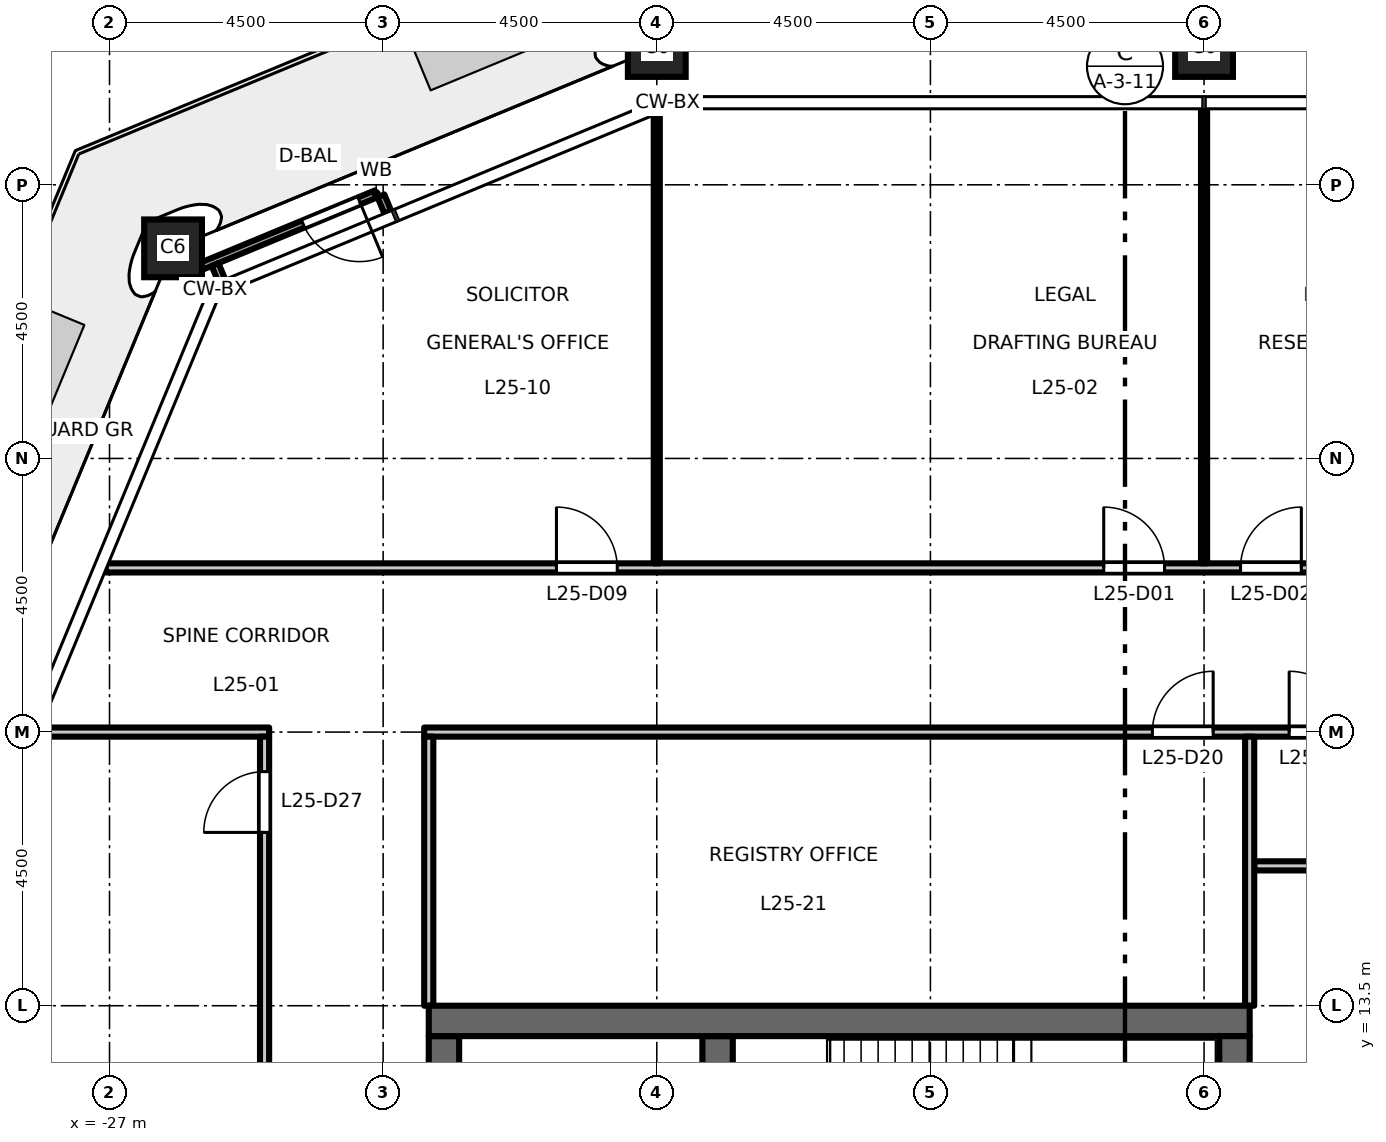
"""IFC4 building model, lengths in metres.
Left out: names, types, materials, properties, quantities, classifications, styles, units other than length and angle.
Written with IfcOpenShell. Run it as: python <this file> out.ifc"""

import sys

from ifc_helpers import new_model, si_unit, direction, frame, frame_2d, origin, origin_2d, place, context, subcontext, project, spatial, rectangle, hollow_rectangle, extrude, element, fill, save


model = new_model("IFC4")
c1 = context("Model", 3, precision=1e-05, world=origin(), true_north=direction((0.0, 1.0)))
c2 = subcontext(c1, "Body", "Model", "MODEL_VIEW")
j1 = project(units=[si_unit("LENGTHUNIT", "METRE"), si_unit("PLANEANGLEUNIT", "RADIAN")], contexts=[c1])
p1 = place(None, origin())
s1 = spatial("IfcSite", under=j1, at=p1, CompositionType="ELEMENT")
p2 = place(p1, origin())
s2 = spatial("IfcBuilding", under=s1, at=p2, CompositionType="ELEMENT")
p3 = place(p2, frame((0.0, 0.0, 118.2)))
s3 = spatial("IfcBuildingStorey", under=s2, at=p3, CompositionType="ELEMENT", Elevation=118.2)
for number, where, z_axis, x_axis in (
    (1, (-9.0, 29.25, 0.0), (0.0, 0.0, 1.0), (1.0, 0.0, 0.0)),
    (2, (-18.0, 29.25, 0.0), (0.0, 0.0, 1.0), (1.0, 0.0, 0.0)),
    (3, (-25.955, 25.955, 0.0), (0.0, 0.0, 1.0), (1.0, 0.0, 0.0)),
):
    element("IfcColumn", number, at=place(p3, frame(where, z_axis=z_axis, x_axis=x_axis)), inside=s3, PredefinedType="COLUMN", context=c2, shape_type="SweptSolid", body=[
        extrude(hollow_rectangle(XDim=0.95, YDim=0.95, WallThickness=0.055, at=origin_2d()), origin(), (0.0, 0.0, 1.0), 4.5),
    ])
p4 = place(p3, frame((-21.5, -13.0, 0.0), z_axis=(0.0, 0.0, 1.0), x_axis=(0.0, 1.0, 0.0)))
e4 = element("IfcWall", 4, at=p4, inside=s3, PredefinedType="SHEAR", context=c2, shape_type="SweptSolid", body=[
    extrude(rectangle(XDim=26.0, YDim=0.5, at=frame_2d((13.0, 0.0))), origin(), (0.0, 0.0, 1.0), 4.35),
])
p5 = place(p4, frame((16.825, 0.0, 0.0)))
e5 = element("IfcOpeningElement", 5, at=p5, cuts=e4, PredefinedType="OPENING", context=c2, shape_type="SweptSolid", body=[
    extrude(rectangle(XDim=1.8, YDim=2.1, at=frame_2d((0.9, 1.05))), frame((0.0, 0.26, 0.0), z_axis=(0.0, -1.0, 0.0), x_axis=(1.0, 0.0, 0.0)), (0.0, 0.0, 1.0), 0.52),
])
p6 = place(p4, frame((7.375, 0.0, 0.0)))
e6 = element("IfcOpeningElement", 6, at=p6, cuts=e4, PredefinedType="OPENING", context=c2, shape_type="SweptSolid", body=[
    extrude(rectangle(XDim=1.8, YDim=2.1, at=frame_2d((0.9, 1.05))), frame((0.0, 0.26, 0.0), z_axis=(0.0, -1.0, 0.0), x_axis=(1.0, 0.0, 0.0)), (0.0, 0.0, 1.0), 0.52),
])
p7 = place(p4, frame((22.45, 0.0, 0.0)))
e7 = element("IfcOpeningElement", 7, at=p7, cuts=e4, PredefinedType="OPENING", context=c2, shape_type="SweptSolid", body=[
    extrude(rectangle(XDim=0.9, YDim=2.1, at=frame_2d((0.45, 1.05))), frame((0.0, 0.26, 0.0), z_axis=(0.0, -1.0, 0.0), x_axis=(1.0, 0.0, 0.0)), (0.0, 0.0, 1.0), 0.52),
])
p8 = place(p4, frame((1.7, 0.0, 0.0)))
e8 = element("IfcOpeningElement", 8, at=p8, cuts=e4, PredefinedType="OPENING", context=c2, shape_type="SweptSolid", body=[
    extrude(rectangle(XDim=0.9, YDim=2.1, at=frame_2d((0.45, 1.05))), frame((0.0, 0.26, 0.0), z_axis=(0.0, -1.0, 0.0), x_axis=(1.0, 0.0, 0.0)), (0.0, 0.0, 1.0), 0.52),
])
p9 = place(p3, frame((-17.0, 6.425, 0.0), z_axis=(0.0, 0.0, 1.0), x_axis=(0.0, 1.0, 0.0)))
e9 = element("IfcWall", 9, at=p9, inside=s3, PredefinedType="SHEAR", context=c2, shape_type="SweptSolid", body=[
    extrude(rectangle(XDim=6.575, YDim=0.5, at=frame_2d((3.288, 0.0))), origin(), (0.0, 0.0, 1.0), 4.35),
])
p10 = place(p3, frame((-8.25, 13.25, 0.0), z_axis=(0.0, 0.0, 1.0), x_axis=(-1.0, 0.0, 0.0)))
e10 = element("IfcWall", 10, at=p10, inside=s3, PredefinedType="SHEAR", context=c2, shape_type="SweptSolid", body=[
    extrude(rectangle(XDim=13.5, YDim=0.5, at=frame_2d((6.75, 0.0))), origin(), (0.0, 0.0, 1.0), 4.35),
])
p11 = place(p3, frame((-8.5, -13.0, 0.0), z_axis=(0.0, 0.0, 1.0), x_axis=(0.0, 1.0, 0.0)))
e11 = element("IfcWall", 11, at=p11, inside=s3, PredefinedType="SHEAR", context=c2, shape_type="SweptSolid", body=[
    extrude(rectangle(XDim=26.0, YDim=0.5, at=frame_2d((13.0, 0.0))), origin(), (0.0, 0.0, 1.0), 4.35),
])
for number, where, z_axis, x_axis in (
    (12, (-22.425, 26.551, 0.0), (0.0, 0.0, 1.0), (-0.382, 0.924, 0.0)),
    (13, (-25.153, 25.421, 0.0), (0.0, 0.0, 1.0), (-0.383, 0.924, 0.0)),
):
    element("IfcWall", number, at=place(p3, frame(where, z_axis=z_axis, x_axis=x_axis)), inside=s3, PredefinedType="STANDARD", context=c2, shape_type="SweptSolid", body=[
        extrude(rectangle(XDim=0.29, YDim=0.12, at=frame_2d((0.145, 0.0))), origin(), (0.0, 0.0, 1.0), 4.35),
    ])
p12 = place(p3, frame((-22.615, 26.852, 0.0), z_axis=(0.0, 0.0, 1.0), x_axis=(-0.923869084389, -0.382708655389, 0.0)))
e14 = element("IfcWall", 14, at=p12, inside=s3, PredefinedType="STANDARD", context=c2, shape_type="SweptSolid", body=[
    extrude(rectangle(XDim=3.102, YDim=0.12, at=frame_2d((1.551, 0.0))), origin(), (0.0, 0.0, 1.0), 4.35),
])
p13 = place(p12, frame((0.3, 0.0, 0.0)))
e15 = element("IfcOpeningElement", 15, at=p13, cuts=e14, PredefinedType="OPENING", context=c2, shape_type="SweptSolid", body=[
    extrude(rectangle(XDim=1.0, YDim=2.4, at=frame_2d((0.5, 1.2))), frame((0.0, 0.07, 0.0), z_axis=(0.0, -1.0, 0.0), x_axis=(1.0, 0.0, 0.0)), (0.0, 0.0, 1.0), 0.14),
])
p14 = place(p3, frame((-8.175, 15.8, 0.0), z_axis=(0.0, 0.0, 1.0), x_axis=(1.0, 0.0, 0.0)))
e16 = element("IfcWall", 16, at=p14, inside=s3, PredefinedType="PARTITIONING", context=c2, shape_type="SweptSolid", body=[
    extrude(rectangle(XDim=14.715, YDim=0.15, at=frame_2d((7.357, 0.0))), origin(), (0.0, 0.0, 1.0), 4.35),
])
p15 = place(p14, frame((4.325, 0.0, 0.0)))
e17 = element("IfcOpeningElement", 17, at=p15, cuts=e16, PredefinedType="OPENING", context=c2, shape_type="SweptSolid", body=[
    extrude(rectangle(XDim=1.0, YDim=2.1, at=frame_2d((0.5, 1.05))), frame((0.0, 0.085, 0.0), z_axis=(0.0, -1.0, 0.0), x_axis=(1.0, 0.0, 0.0)), (0.0, 0.0, 1.0), 0.17),
])
p16 = place(p14, frame((6.575, 0.0, 0.0)))
e18 = element("IfcOpeningElement", 18, at=p16, cuts=e16, PredefinedType="OPENING", context=c2, shape_type="SweptSolid", body=[
    extrude(rectangle(XDim=1.0, YDim=2.1, at=frame_2d((0.5, 1.05))), frame((0.0, 0.085, 0.0), z_axis=(0.0, -1.0, 0.0), x_axis=(1.0, 0.0, 0.0)), (0.0, 0.0, 1.0), 0.17),
])
p17 = place(p14, frame((13.075, 0.0, 0.0)))
e19 = element("IfcOpeningElement", 19, at=p17, cuts=e16, PredefinedType="OPENING", context=c2, shape_type="SweptSolid", body=[
    extrude(rectangle(XDim=1.0, YDim=2.1, at=frame_2d((0.5, 1.05))), frame((0.0, 0.085, 0.0), z_axis=(0.0, -1.0, 0.0), x_axis=(1.0, 0.0, 0.0)), (0.0, 0.0, 1.0), 0.17),
])
p18 = place(p3, frame((-28.178, 18.0, 0.0), z_axis=(0.0, 0.0, 1.0), x_axis=(1.0, 0.0, 0.0)))
e20 = element("IfcWall", 20, at=p18, inside=s3, PredefinedType="PARTITIONING", context=c2, shape_type="SweptSolid", body=[
    extrude(rectangle(XDim=3.803, YDim=0.15, at=frame_2d((1.901, 0.0))), origin(), (0.0, 0.0, 1.0), 4.35),
])
p19 = place(p3, frame((-21.825, 18.0, 0.0), z_axis=(0.0, 0.0, 1.0), x_axis=(1.0, 0.0, 0.0)))
e21 = element("IfcWall", 21, at=p19, inside=s3, PredefinedType="PARTITIONING", context=c2, shape_type="SweptSolid", body=[
    extrude(rectangle(XDim=43.65, YDim=0.15, at=frame_2d((21.825, 0.0))), origin(), (0.0, 0.0, 1.0), 4.35),
])
p20 = place(p19, frame((14.225, 0.0, 0.0)))
e22 = element("IfcOpeningElement", 22, at=p20, cuts=e21, PredefinedType="OPENING", context=c2, shape_type="SweptSolid", body=[
    extrude(rectangle(XDim=1.0, YDim=2.1, at=frame_2d((0.5, 1.05))), frame((0.0, 0.085, 0.0), z_axis=(0.0, -1.0, 0.0), x_axis=(1.0, 0.0, 0.0)), (0.0, 0.0, 1.0), 0.17),
])
p21 = place(p19, frame((11.975, 0.0, 0.0)))
e23 = element("IfcOpeningElement", 23, at=p21, cuts=e21, PredefinedType="OPENING", context=c2, shape_type="SweptSolid", body=[
    extrude(rectangle(XDim=1.0, YDim=2.1, at=frame_2d((0.5, 1.05))), frame((0.0, 0.085, 0.0), z_axis=(0.0, -1.0, 0.0), x_axis=(1.0, 0.0, 0.0)), (0.0, 0.0, 1.0), 0.17),
])
p22 = place(p19, frame((30.725, 0.0, 0.0)))
e24 = element("IfcOpeningElement", 24, at=p22, cuts=e21, PredefinedType="OPENING", context=c2, shape_type="SweptSolid", body=[
    extrude(rectangle(XDim=1.0, YDim=2.1, at=frame_2d((0.5, 1.05))), frame((0.0, 0.085, 0.0), z_axis=(0.0, -1.0, 0.0), x_axis=(1.0, 0.0, 0.0)), (0.0, 0.0, 1.0), 0.17),
])
p23 = place(p3, frame((-27.06, 20.7, 0.0), z_axis=(0.0, 0.0, 1.0), x_axis=(1.0, 0.0, 0.0)))
e25 = element("IfcWall", 25, at=p23, inside=s3, PredefinedType="PARTITIONING", context=c2, shape_type="SweptSolid", body=[
    extrude(rectangle(XDim=54.12, YDim=0.15, at=frame_2d((27.06, 0.0))), origin(), (0.0, 0.0, 1.0), 4.35),
])
p24 = place(p23, frame((16.41, 0.0, 0.0)))
e26 = element("IfcOpeningElement", 26, at=p24, cuts=e25, PredefinedType="OPENING", context=c2, shape_type="SweptSolid", body=[
    extrude(rectangle(XDim=1.0, YDim=2.1, at=frame_2d((0.5, 1.05))), frame((0.0, 0.085, 0.0), z_axis=(0.0, -1.0, 0.0), x_axis=(1.0, 0.0, 0.0)), (0.0, 0.0, 1.0), 0.17),
])
p25 = place(p23, frame((18.66, 0.0, 0.0)))
e27 = element("IfcOpeningElement", 27, at=p25, cuts=e25, PredefinedType="OPENING", context=c2, shape_type="SweptSolid", body=[
    extrude(rectangle(XDim=1.0, YDim=2.1, at=frame_2d((0.5, 1.05))), frame((0.0, 0.085, 0.0), z_axis=(0.0, -1.0, 0.0), x_axis=(1.0, 0.0, 0.0)), (0.0, 0.0, 1.0), 0.17),
])
p26 = place(p23, frame((34.41, 0.0, 0.0)))
e28 = element("IfcOpeningElement", 28, at=p26, cuts=e25, PredefinedType="OPENING", context=c2, shape_type="SweptSolid", body=[
    extrude(rectangle(XDim=1.0, YDim=2.1, at=frame_2d((0.5, 1.05))), frame((0.0, 0.085, 0.0), z_axis=(0.0, -1.0, 0.0), x_axis=(1.0, 0.0, 0.0)), (0.0, 0.0, 1.0), 0.17),
])
p27 = place(p23, frame((36.66, 0.0, 0.0)))
e29 = element("IfcOpeningElement", 29, at=p27, cuts=e25, PredefinedType="OPENING", context=c2, shape_type="SweptSolid", body=[
    extrude(rectangle(XDim=1.0, YDim=2.1, at=frame_2d((0.5, 1.05))), frame((0.0, 0.085, 0.0), z_axis=(0.0, -1.0, 0.0), x_axis=(1.0, 0.0, 0.0)), (0.0, 0.0, 1.0), 0.17),
])
p28 = place(p23, frame((7.41, 0.0, 0.0)))
e30 = element("IfcOpeningElement", 30, at=p28, cuts=e25, PredefinedType="OPENING", context=c2, shape_type="SweptSolid", body=[
    extrude(rectangle(XDim=1.0, YDim=2.1, at=frame_2d((0.5, 1.05))), frame((0.0, 0.085, 0.0), z_axis=(0.0, -1.0, 0.0), x_axis=(1.0, 0.0, 0.0)), (0.0, 0.0, 1.0), 0.17),
])
p29 = place(p23, frame((45.72, 0.0, 0.0)))
e31 = element("IfcOpeningElement", 31, at=p29, cuts=e25, PredefinedType="OPENING", context=c2, shape_type="SweptSolid", body=[
    extrude(rectangle(XDim=1.0, YDim=2.1, at=frame_2d((0.5, 1.05))), frame((0.0, 0.085, 0.0), z_axis=(0.0, -1.0, 0.0), x_axis=(1.0, 0.0, 0.0)), (0.0, 0.0, 1.0), 0.17),
])
p30 = place(p3, frame((-24.45, -17.925, 0.0), z_axis=(0.0, 0.0, 1.0), x_axis=(0.0, 1.0, 0.0)))
e32 = element("IfcWall", 32, at=p30, inside=s3, PredefinedType="PARTITIONING", context=c2, shape_type="SweptSolid", body=[
    extrude(rectangle(XDim=35.85, YDim=0.15, at=frame_2d((17.925, 0.0))), origin(), (0.0, 0.0, 1.0), 4.35),
])
p31 = place(p30, frame((0.525, 0.0, 0.0)))
e33 = element("IfcOpeningElement", 33, at=p31, cuts=e32, PredefinedType="OPENING", context=c2, shape_type="SweptSolid", body=[
    extrude(rectangle(XDim=1.0, YDim=2.1, at=frame_2d((0.5, 1.05))), frame((0.0, 0.085, 0.0), z_axis=(0.0, -1.0, 0.0), x_axis=(1.0, 0.0, 0.0)), (0.0, 0.0, 1.0), 0.17),
])
p32 = place(p30, frame((16.275, 0.0, 0.0)))
e34 = element("IfcOpeningElement", 34, at=p32, cuts=e32, PredefinedType="OPENING", context=c2, shape_type="SweptSolid", body=[
    extrude(rectangle(XDim=1.0, YDim=2.1, at=frame_2d((0.5, 1.05))), frame((0.0, 0.085, 0.0), z_axis=(0.0, -1.0, 0.0), x_axis=(1.0, 0.0, 0.0)), (0.0, 0.0, 1.0), 0.17),
])
p33 = place(p30, frame((18.525, 0.0, 0.0)))
e35 = element("IfcOpeningElement", 35, at=p33, cuts=e32, PredefinedType="OPENING", context=c2, shape_type="SweptSolid", body=[
    extrude(rectangle(XDim=1.0, YDim=2.1, at=frame_2d((0.5, 1.05))), frame((0.0, 0.085, 0.0), z_axis=(0.0, -1.0, 0.0), x_axis=(1.0, 0.0, 0.0)), (0.0, 0.0, 1.0), 0.17),
])
p34 = place(p30, frame((34.275, 0.0, 0.0)))
e36 = element("IfcOpeningElement", 36, at=p34, cuts=e32, PredefinedType="OPENING", context=c2, shape_type="SweptSolid", body=[
    extrude(rectangle(XDim=1.0, YDim=2.1, at=frame_2d((0.5, 1.05))), frame((0.0, 0.085, 0.0), z_axis=(0.0, -1.0, 0.0), x_axis=(1.0, 0.0, 0.0)), (0.0, 0.0, 1.0), 0.17),
])
p35 = place(p3, frame((-21.75, 13.5, 0.0), z_axis=(0.0, 0.0, 1.0), x_axis=(0.0, 1.0, 0.0)))
e37 = element("IfcWall", 37, at=p35, inside=s3, PredefinedType="PARTITIONING", context=c2, shape_type="SweptSolid", body=[
    extrude(rectangle(XDim=4.425, YDim=0.15, at=frame_2d((2.212, 0.0))), origin(), (0.0, 0.0, 1.0), 4.35),
])
p36 = place(p3, frame((-18.0, 20.775, 0.0), z_axis=(0.0, 0.0, 1.0), x_axis=(0.0, 1.0, 0.0)))
e38 = element("IfcWall", 38, at=p36, inside=s3, PredefinedType="PARTITIONING", context=c2, shape_type="SweptSolid", body=[
    extrude(rectangle(XDim=7.403, YDim=0.1, at=frame_2d((3.702, 0.0))), origin(), (0.0, 0.0, 1.0), 3.45),
])
p37 = place(p3, frame((-9.0, 20.775, 0.0), z_axis=(0.0, 0.0, 1.0), x_axis=(0.0, 1.0, 0.0)))
e39 = element("IfcWall", 39, at=p37, inside=s3, PredefinedType="PARTITIONING", context=c2, shape_type="SweptSolid", body=[
    extrude(rectangle(XDim=7.485, YDim=0.1, at=frame_2d((3.743, 0.0))), origin(), (0.0, 0.0, 1.0), 3.45),
])
p38 = place(p3, frame((-8.25, 13.5, 0.0), z_axis=(0.0, 0.0, 1.0), x_axis=(0.0, 1.0, 0.0)))
e40 = element("IfcWall", 40, at=p38, inside=s3, PredefinedType="PARTITIONING", context=c2, shape_type="SweptSolid", body=[
    extrude(rectangle(XDim=4.425, YDim=0.15, at=frame_2d((2.212, 0.0))), origin(), (0.0, 0.0, 1.0), 4.35),
])
p39 = place(p13, origin())
e41 = element("IfcDoor", 41, at=p39, inside=s3, OperationType="SINGLE_SWING_LEFT", PredefinedType="DOOR", context=c2, shape_type="SweptSolid", body=[
    extrude(rectangle(XDim=1.0, YDim=2.4, at=frame_2d((0.5, 1.2))), frame((0.0, 0.025, 0.0), z_axis=(0.0, -1.0, 0.0), x_axis=(1.0, 0.0, 0.0)), (0.0, 0.0, 1.0), 0.05),
])
fill(e15, e41)
p40 = place(p24, origin())
e42 = element("IfcDoor", 42, at=p40, inside=s3, OperationType="SINGLE_SWING_LEFT", PredefinedType="DOOR", context=c2, shape_type="SweptSolid", body=[
    extrude(rectangle(XDim=1.0, YDim=2.1, at=frame_2d((0.5, 1.05))), frame((0.0, 0.025, 0.0), z_axis=(0.0, -1.0, 0.0), x_axis=(1.0, 0.0, 0.0)), (0.0, 0.0, 1.0), 0.05),
])
fill(e26, e42)
p41 = place(p25, origin())
e43 = element("IfcDoor", 43, at=p41, inside=s3, OperationType="SINGLE_SWING_RIGHT", PredefinedType="DOOR", context=c2, shape_type="SweptSolid", body=[
    extrude(rectangle(XDim=1.0, YDim=2.1, at=frame_2d((0.5, 1.05))), frame((0.0, 0.025, 0.0), z_axis=(0.0, -1.0, 0.0), x_axis=(1.0, 0.0, 0.0)), (0.0, 0.0, 1.0), 0.05),
])
fill(e27, e43)
p42 = place(p28, origin())
e44 = element("IfcDoor", 44, at=p42, inside=s3, OperationType="SINGLE_SWING_LEFT", PredefinedType="DOOR", context=c2, shape_type="SweptSolid", body=[
    extrude(rectangle(XDim=1.0, YDim=2.1, at=frame_2d((0.5, 1.05))), frame((0.0, 0.025, 0.0), z_axis=(0.0, -1.0, 0.0), x_axis=(1.0, 0.0, 0.0)), (0.0, 0.0, 1.0), 0.05),
])
fill(e30, e44)
p43 = place(p20, origin())
e45 = element("IfcDoor", 45, at=p43, inside=s3, OperationType="SINGLE_SWING_LEFT", PredefinedType="DOOR", context=c2, shape_type="SweptSolid", body=[
    extrude(rectangle(XDim=1.0, YDim=2.1, at=frame_2d((0.5, 1.05))), frame((0.0, 0.025, 0.0), z_axis=(0.0, -1.0, 0.0), x_axis=(1.0, 0.0, 0.0)), (0.0, 0.0, 1.0), 0.05),
])
fill(e22, e45)
p44 = place(p21, origin())
e46 = element("IfcDoor", 46, at=p44, inside=s3, OperationType="SINGLE_SWING_RIGHT", PredefinedType="DOOR", context=c2, shape_type="SweptSolid", body=[
    extrude(rectangle(XDim=1.0, YDim=2.1, at=frame_2d((0.5, 1.05))), frame((0.0, 0.025, 0.0), z_axis=(0.0, -1.0, 0.0), x_axis=(1.0, 0.0, 0.0)), (0.0, 0.0, 1.0), 0.05),
])
fill(e23, e46)
p45 = place(p34, origin())
e47 = element("IfcDoor", 47, at=p45, inside=s3, OperationType="SINGLE_SWING_LEFT", PredefinedType="DOOR", context=c2, shape_type="SweptSolid", body=[
    extrude(rectangle(XDim=1.0, YDim=2.1, at=frame_2d((0.5, 1.05))), frame((0.0, 0.025, 0.0), z_axis=(0.0, -1.0, 0.0), x_axis=(1.0, 0.0, 0.0)), (0.0, 0.0, 1.0), 0.05),
])
fill(e36, e47)
save(model, sys.argv[1])
